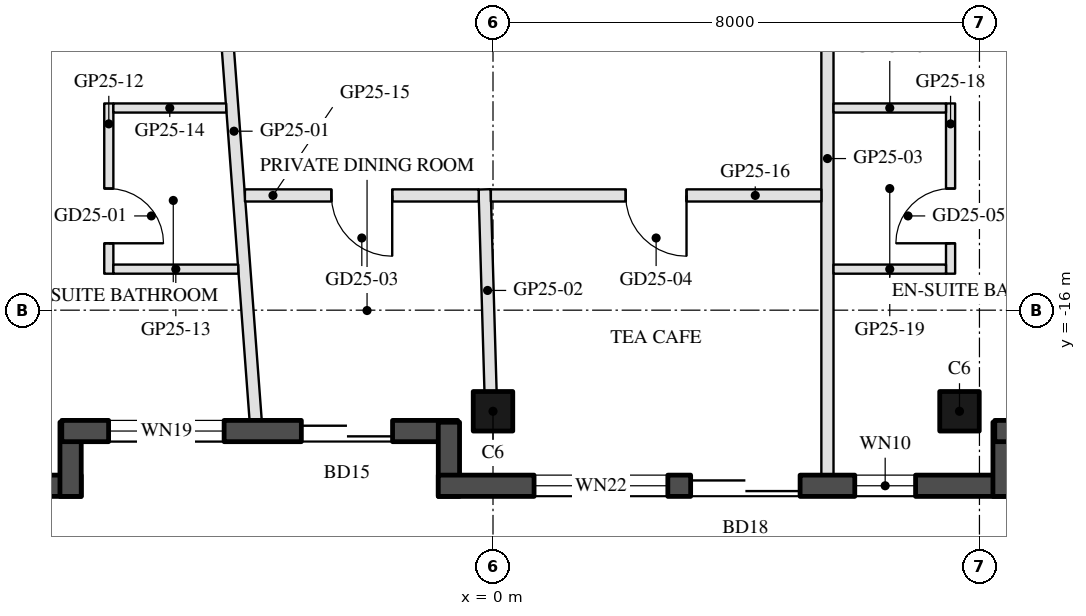
"""IFC4 building model, lengths in metres.
Left out: names, types, materials, properties, quantities, classifications, styles, units other than length and angle.
Written with IfcOpenShell. Run it as: python <this file> out.ifc"""

import sys

from ifc_helpers import new_model, si_unit, direction, frame, frame_2d, origin, origin_2d, place, context, subcontext, project, spatial, rectangle, hollow_rectangle, extrude, boolean, halfspace, element, fill, save


model = new_model("IFC4")
c1 = context("Model", 3, precision=1e-05, world=origin(), true_north=direction((0.0, 1.0)))
c2 = subcontext(c1, "Body", "Model", "MODEL_VIEW")
j1 = project(units=[si_unit("LENGTHUNIT", "METRE"), si_unit("PLANEANGLEUNIT", "RADIAN")], contexts=[c1])
p1 = place(None, origin())
s1 = spatial("IfcSite", under=j1, at=p1, CompositionType="ELEMENT")
p2 = place(p1, origin())
s2 = spatial("IfcBuilding", under=s1, at=p2, CompositionType="ELEMENT")
p3 = place(p2, frame((0.0, 0.0, 257.8)))
s3 = spatial("IfcBuildingStorey", under=s2, at=p3, CompositionType="ELEMENT", Elevation=257.8)
p4 = place(p3, frame((0.0, -17.663, 0.0), z_axis=(0.0, 0.0, 1.0), x_axis=(-1.0, 0.0, 0.0)))
e1 = element("IfcColumn", 1, at=p4, inside=s3, PredefinedType="COLUMN", context=c2, shape_type="SweptSolid", body=[
    boolean("DIFFERENCE", extrude(hollow_rectangle(XDim=0.65, YDim=0.65, WallThickness=0.03, at=origin_2d()), origin(), (0.0, 0.0, 1.0), 3.7), halfspace(frame((0.0, 0.0, 0.037), z_axis=(0.0, 0.0, 1.0), x_axis=(1.0, 0.0, 0.0)), True)),
])
p5 = place(p3, frame((7.672, -17.663, 0.0), z_axis=(0.0, 0.0, 1.0), x_axis=(-1.0, 0.0, 0.0)))
e2 = element("IfcColumn", 2, at=p5, inside=s3, PredefinedType="COLUMN", context=c2, shape_type="SweptSolid", body=[
    boolean("DIFFERENCE", extrude(hollow_rectangle(XDim=0.65, YDim=0.65, WallThickness=0.03, at=origin_2d()), origin(), (0.0, 0.0, 1.0), 3.7), halfspace(frame((0.0, 0.0, 0.04), z_axis=(0.0, 0.0, 1.0), x_axis=(1.0, 0.0, 0.0)), True)),
])
p6 = place(p3, frame((-18.272, -18.888, 0.0), z_axis=(0.0, 0.0, 1.0), x_axis=(1.0, 0.0, 0.0)))
e3 = element("IfcWall", 3, at=p6, inside=s3, PredefinedType="SOLIDWALL", context=c2, shape_type="SweptSolid", body=[
    extrude(rectangle(XDim=11.5, YDim=0.35, at=frame_2d((5.75, 0.0))), origin(), (0.0, 0.0, 1.0), 3.55),
])
p7 = place(p6, frame((0.38, 0.0, 0.3)))
e4 = element("IfcOpeningElement", 4, at=p7, cuts=e3, PredefinedType="OPENING", context=c2, shape_type="SweptSolid", body=[
    extrude(rectangle(XDim=1.8, YDim=2.65, at=frame_2d((0.9, 1.325))), frame((0.0, 0.185, 0.0), z_axis=(0.0, -1.0, 0.0), x_axis=(1.0, 0.0, 0.0)), (0.0, 0.0, 1.0), 0.37),
])
p8 = place(p6, frame((7.525, 0.0, 0.0)))
e5 = element("IfcOpeningElement", 5, at=p8, cuts=e3, PredefinedType="OPENING", context=c2, shape_type="SweptSolid", body=[
    extrude(rectangle(XDim=2.4, YDim=2.4, at=frame_2d((1.2, 1.2))), frame((0.0, 0.185, 0.0), z_axis=(0.0, -1.0, 0.0), x_axis=(1.0, 0.0, 0.0)), (0.0, 0.0, 1.0), 0.37),
])
p9 = place(p6, frame((3.604, 0.0, 0.3)))
e6 = element("IfcOpeningElement", 6, at=p9, cuts=e3, PredefinedType="OPENING", context=c2, shape_type="SweptSolid", body=[
    extrude(rectangle(XDim=1.6, YDim=2.65, at=frame_2d((0.8, 1.325))), frame((0.0, 0.185, 0.0), z_axis=(0.0, -1.0, 0.0), x_axis=(1.0, 0.0, 0.0)), (0.0, 0.0, 1.0), 0.37),
])
p10 = place(p6, frame((5.504, 0.0, 0.3)))
e7 = element("IfcOpeningElement", 7, at=p10, cuts=e3, PredefinedType="OPENING", context=c2, shape_type="SweptSolid", body=[
    extrude(rectangle(XDim=1.6, YDim=2.65, at=frame_2d((0.8, 1.325))), frame((0.0, 0.185, 0.0), z_axis=(0.0, -1.0, 0.0), x_axis=(1.0, 0.0, 0.0)), (0.0, 0.0, 1.0), 0.37),
])
p11 = place(p3, frame((-6.947, -19.063, 0.0), z_axis=(0.0, 0.0, 1.0), x_axis=(0.0, 1.0, 0.0)))
e8 = element("IfcWall", 8, at=p11, inside=s3, PredefinedType="SOLIDWALL", context=c2, shape_type="SweptSolid", body=[
    extrude(rectangle(XDim=1.22, YDim=0.35, at=frame_2d((0.61, 0.0))), origin(), (0.0, 0.0, 1.0), 3.55),
])
p12 = place(p3, frame((-7.092, -17.988, 0.0), z_axis=(0.0, 0.0, 1.0), x_axis=(1.0, 0.0, 0.0)))
e9 = element("IfcWall", 9, at=p12, inside=s3, PredefinedType="SOLIDWALL", context=c2, shape_type="SweptSolid", body=[
    extrude(rectangle(XDim=6.512, YDim=0.35, at=frame_2d((3.256, 0.0))), origin(), (0.0, 0.0, 1.0), 3.55),
])
p13 = place(p12, frame((0.77, 0.0, 0.3)))
e10 = element("IfcOpeningElement", 10, at=p13, cuts=e9, PredefinedType="OPENING", context=c2, shape_type="SweptSolid", body=[
    extrude(rectangle(XDim=1.9, YDim=2.65, at=frame_2d((0.95, 1.325))), frame((0.0, 0.185, 0.0), z_axis=(0.0, -1.0, 0.0), x_axis=(1.0, 0.0, 0.0)), (0.0, 0.0, 1.0), 0.37),
])
p14 = place(p12, frame((3.94, 0.0, 0.0)))
e11 = element("IfcOpeningElement", 11, at=p14, cuts=e9, PredefinedType="OPENING", context=c2, shape_type="SweptSolid", body=[
    extrude(rectangle(XDim=1.5, YDim=2.4, at=frame_2d((0.75, 1.2))), frame((0.0, 0.185, 0.0), z_axis=(0.0, -1.0, 0.0), x_axis=(1.0, 0.0, 0.0)), (0.0, 0.0, 1.0), 0.37),
])
p15 = place(p3, frame((-0.725, -17.843, 0.0), z_axis=(0.0, 0.0, 1.0), x_axis=(0.0, -1.0, 0.0)))
e12 = element("IfcWall", 12, at=p15, inside=s3, PredefinedType="SOLIDWALL", context=c2, shape_type="SweptSolid", body=[
    extrude(rectangle(XDim=1.22, YDim=0.35, at=frame_2d((0.61, 0.0))), origin(), (0.0, 0.0, 1.0), 3.55),
])
p16 = place(p3, frame((-0.9, -18.888, 0.0), z_axis=(0.0, 0.0, 1.0), x_axis=(1.0, 0.0, 0.0)))
e13 = element("IfcWall", 13, at=p16, inside=s3, PredefinedType="SOLIDWALL", context=c2, shape_type="SweptSolid", body=[
    extrude(rectangle(XDim=9.472, YDim=0.35, at=frame_2d((4.736, 0.0))), origin(), (0.0, 0.0, 1.0), 3.55),
])
p17 = place(p16, frame((4.15, 0.0, 0.0)))
e14 = element("IfcOpeningElement", 14, at=p17, cuts=e13, PredefinedType="OPENING", context=c2, shape_type="SweptSolid", body=[
    extrude(rectangle(XDim=1.8, YDim=2.4, at=frame_2d((0.9, 1.2))), frame((0.0, 0.185, 0.0), z_axis=(0.0, -1.0, 0.0), x_axis=(1.0, 0.0, 0.0)), (0.0, 0.0, 1.0), 0.37),
])
p18 = place(p16, frame((1.575, 0.0, 0.3)))
e15 = element("IfcOpeningElement", 15, at=p18, cuts=e13, PredefinedType="OPENING", context=c2, shape_type="SweptSolid", body=[
    extrude(rectangle(XDim=2.2, YDim=2.65, at=frame_2d((1.1, 1.325))), frame((0.0, 0.185, 0.0), z_axis=(0.0, -1.0, 0.0), x_axis=(1.0, 0.0, 0.0)), (0.0, 0.0, 1.0), 0.37),
])
p19 = place(p16, frame((6.85, 0.0, 0.3)))
e16 = element("IfcOpeningElement", 16, at=p19, cuts=e13, PredefinedType="OPENING", context=c2, shape_type="SweptSolid", body=[
    extrude(rectangle(XDim=1.0, YDim=2.65, at=frame_2d((0.5, 1.325))), frame((0.0, 0.185, 0.0), z_axis=(0.0, -1.0, 0.0), x_axis=(1.0, 0.0, 0.0)), (0.0, 0.0, 1.0), 0.37),
])
p20 = place(p3, frame((8.397, -19.063, 0.0), z_axis=(0.0, 0.0, 1.0), x_axis=(0.0, 1.0, 0.0)))
e17 = element("IfcWall", 17, at=p20, inside=s3, PredefinedType="SOLIDWALL", context=c2, shape_type="SweptSolid", body=[
    extrude(rectangle(XDim=1.22, YDim=0.35, at=frame_2d((0.61, 0.0))), origin(), (0.0, 0.0, 1.0), 3.55),
])
p21 = place(p3, frame((8.252, -17.988, 0.0), z_axis=(0.0, 0.0, 1.0), x_axis=(1.0, 0.0, 0.0)))
e18 = element("IfcWall", 18, at=p21, inside=s3, PredefinedType="SOLIDWALL", context=c2, shape_type="SweptSolid", body=[
    extrude(rectangle(XDim=6.512, YDim=0.35, at=frame_2d((3.256, 0.0))), origin(), (0.0, 0.0, 1.0), 3.55),
])
p22 = place(p21, frame((0.77, 0.0, 0.0)))
e19 = element("IfcOpeningElement", 19, at=p22, cuts=e18, PredefinedType="OPENING", context=c2, shape_type="SweptSolid", body=[
    extrude(rectangle(XDim=2.4, YDim=2.4, at=frame_2d((1.2, 1.2))), frame((0.0, 0.185, 0.0), z_axis=(0.0, -1.0, 0.0), x_axis=(1.0, 0.0, 0.0)), (0.0, 0.0, 1.0), 0.37),
])
p23 = place(p21, frame((3.47, 0.0, 0.3)))
e20 = element("IfcOpeningElement", 20, at=p23, cuts=e18, PredefinedType="OPENING", context=c2, shape_type="SweptSolid", body=[
    extrude(rectangle(XDim=2.2, YDim=2.65, at=frame_2d((1.1, 1.325))), frame((0.0, 0.185, 0.0), z_axis=(0.0, -1.0, 0.0), x_axis=(1.0, 0.0, 0.0)), (0.0, 0.0, 1.0), 0.37),
])
p24 = place(p3, frame((8.547, -10.997, 0.0), z_axis=(0.0, 0.0, 1.0), x_axis=(0.86602744543, -0.49999646375, 0.0)))
e21 = element("IfcWall", 21, at=p24, inside=s3, PredefinedType="SHEAR", context=c2, shape_type="SweptSolid", body=[
    extrude(rectangle(XDim=13.934, YDim=0.5, at=frame_2d((6.967, 0.0))), origin(), (0.0, 0.0, 1.0), 3.5),
])
p25 = place(p3, frame((-3.903, -17.813, 0.0), z_axis=(0.0, 0.0, 1.0), x_axis=(-0.074602257677, 0.997213368918, 0.0)))
e22 = element("IfcWall", 22, at=p25, inside=s3, PredefinedType="PARTITIONING", context=c2, shape_type="SweptSolid", body=[
    extrude(rectangle(XDim=9.54, YDim=0.2, at=frame_2d((4.77, 0.0))), origin(), (0.0, 0.0, 1.0), 3.0),
])
p26 = place(p3, frame((-0.04, -17.338, 0.0), z_axis=(0.0, 0.0, 1.0), x_axis=(-0.029431403757, 0.999566802406, 0.0)))
e23 = element("IfcWall", 23, at=p26, inside=s3, PredefinedType="PARTITIONING", context=c2, shape_type="SweptSolid", body=[
    extrude(rectangle(XDim=3.326, YDim=0.2, at=frame_2d((1.663, 0.0))), origin(), (0.0, 0.0, 1.0), 3.0),
])
p27 = place(p3, frame((5.5, -18.713, 0.0), z_axis=(0.0, 0.0, 1.0), x_axis=(0.0, 1.0, 0.0)))
e24 = element("IfcWall", 24, at=p27, inside=s3, PredefinedType="PARTITIONING", context=c2, shape_type="SweptSolid", body=[
    extrude(rectangle(XDim=10.413, YDim=0.2, at=frame_2d((5.207, 0.0))), origin(), (0.0, 0.0, 1.0), 3.16),
])
p28 = place(p3, frame((-6.319, -12.6, 0.0), z_axis=(0.0, 0.0, 1.0), x_axis=(0.0, -1.0, 0.0)))
e25 = element("IfcWall", 25, at=p28, inside=s3, PredefinedType="PARTITIONING", context=c2, shape_type="SweptSolid", body=[
    extrude(rectangle(XDim=2.8, YDim=0.15, at=frame_2d((1.4, 0.0))), origin(), (0.0, 0.0, 1.0), 3.55),
])
p29 = place(p28, frame((1.4, 0.0, 0.0)))
e26 = element("IfcOpeningElement", 26, at=p29, cuts=e25, PredefinedType="OPENING", context=c2, shape_type="SweptSolid", body=[
    extrude(rectangle(XDim=0.9, YDim=2.1, at=frame_2d((0.45, 1.05))), frame((0.0, 0.085, 0.0), z_axis=(0.0, -1.0, 0.0), x_axis=(1.0, 0.0, 0.0)), (0.0, 0.0, 1.0), 0.17),
])
p30 = place(p3, frame((-6.243, -15.325, 0.0), z_axis=(0.0, 0.0, 1.0), x_axis=(1.0, 0.0, 0.0)))
e27 = element("IfcWall", 27, at=p30, inside=s3, PredefinedType="PARTITIONING", context=c2, shape_type="SweptSolid", body=[
    extrude(rectangle(XDim=2.054, YDim=0.15, at=frame_2d((1.027, 0.0))), origin(), (0.0, 0.0, 1.0), 3.55),
])
p31 = place(p3, frame((-6.243, -12.675, 0.0), z_axis=(0.0, 0.0, 1.0), x_axis=(1.0, 0.0, 0.0)))
e28 = element("IfcWall", 28, at=p31, inside=s3, PredefinedType="PARTITIONING", context=c2, shape_type="SweptSolid", body=[
    extrude(rectangle(XDim=1.855, YDim=0.15, at=frame_2d((0.928, 0.0))), origin(), (0.0, 0.0, 1.0), 3.55),
])
p32 = place(p3, frame((-0.235, -14.113, 0.0), z_axis=(0.0, 0.0, 1.0), x_axis=(-1.0, 0.0, 0.0)))
e29 = element("IfcWall", 29, at=p32, inside=s3, PredefinedType="PARTITIONING", context=c2, shape_type="SweptSolid", body=[
    extrude(rectangle(XDim=3.845, YDim=0.2, at=frame_2d((1.922, 0.0))), origin(), (0.0, 0.0, 1.0), 3.0),
])
p33 = place(p32, frame((1.422, 0.0, 0.0)))
e30 = element("IfcOpeningElement", 30, at=p33, cuts=e29, PredefinedType="OPENING", context=c2, shape_type="SweptSolid", body=[
    extrude(rectangle(XDim=1.0, YDim=2.1, at=frame_2d((0.5, 1.05))), frame((0.0, 0.11, 0.0), z_axis=(0.0, -1.0, 0.0), x_axis=(1.0, 0.0, 0.0)), (0.0, 0.0, 1.0), 0.22),
])
p34 = place(p3, frame((5.4, -14.113, 0.0), z_axis=(0.0, 0.0, 1.0), x_axis=(-1.0, 0.0, 0.0)))
e31 = element("IfcWall", 31, at=p34, inside=s3, PredefinedType="PARTITIONING", context=c2, shape_type="SweptSolid", body=[
    extrude(rectangle(XDim=5.435, YDim=0.2, at=frame_2d((2.718, 0.0))), origin(), (0.0, 0.0, 1.0), 3.0),
])
p35 = place(p34, frame((2.218, 0.0, 0.0)))
e32 = element("IfcOpeningElement", 32, at=p35, cuts=e31, PredefinedType="OPENING", context=c2, shape_type="SweptSolid", body=[
    extrude(rectangle(XDim=1.0, YDim=2.1, at=frame_2d((0.5, 1.05))), frame((0.0, 0.11, 0.0), z_axis=(0.0, -1.0, 0.0), x_axis=(1.0, 0.0, 0.0)), (0.0, 0.0, 1.0), 0.22),
])
p36 = place(p3, frame((7.525, -15.4, 0.0), z_axis=(0.0, 0.0, 1.0), x_axis=(0.0, 1.0, 0.0)))
e33 = element("IfcWall", 33, at=p36, inside=s3, PredefinedType="PARTITIONING", context=c2, shape_type="SweptSolid", body=[
    extrude(rectangle(XDim=2.8, YDim=0.15, at=frame_2d((1.4, 0.0))), origin(), (0.0, 0.0, 1.0), 3.0),
])
p37 = place(p36, frame((0.5, 0.0, 0.0)))
e34 = element("IfcOpeningElement", 34, at=p37, cuts=e33, PredefinedType="OPENING", context=c2, shape_type="SweptSolid", body=[
    extrude(rectangle(XDim=0.9, YDim=2.1, at=frame_2d((0.45, 1.05))), frame((0.0, 0.085, 0.0), z_axis=(0.0, -1.0, 0.0), x_axis=(1.0, 0.0, 0.0)), (0.0, 0.0, 1.0), 0.17),
])
for number, where, z_axis, x_axis in (
    (35, (5.6, -15.325, 0.0), (0.0, 0.0, 1.0), (1.0, 0.0, 0.0)),
    (36, (5.6, -12.675, 0.0), (0.0, 0.0, 1.0), (1.0, 0.0, 0.0)),
):
    element("IfcWall", number, at=place(p3, frame(where, z_axis=z_axis, x_axis=x_axis)), inside=s3, PredefinedType="PARTITIONING", context=c2, shape_type="SweptSolid", body=[
        extrude(rectangle(XDim=1.85, YDim=0.15, at=frame_2d((0.925, 0.0))), origin(), (0.0, 0.0, 1.0), 3.55),
    ])
p38 = place(p13, origin())
e37 = element("IfcWindow", 37, at=p38, inside=s3, PartitioningType="SINGLE_PANEL", PredefinedType="WINDOW", context=c2, shape_type="SweptSolid", body=[
    extrude(rectangle(XDim=1.9, YDim=2.65, at=frame_2d((0.95, 1.325))), frame((0.0, 0.03, 0.0), z_axis=(0.0, -1.0, 0.0), x_axis=(1.0, 0.0, 0.0)), (0.0, 0.0, 1.0), 0.06),
])
fill(e10, e37)
p39 = place(p14, frame((1.5, 0.0, 0.0), z_axis=(0.0, 0.0, 1.0), x_axis=(-1.0, 0.0, 0.0)))
e38 = element("IfcDoor", 38, at=p39, inside=s3, OperationType="SLIDING_TO_LEFT", PredefinedType="DOOR", context=c2, shape_type="SweptSolid", body=[
    extrude(rectangle(XDim=1.5, YDim=2.4, at=frame_2d((0.75, 1.2))), frame((0.0, 0.025, 0.0), z_axis=(0.0, -1.0, 0.0), x_axis=(1.0, 0.0, 0.0)), (0.0, 0.0, 1.0), 0.05),
])
fill(e11, e38)
p40 = place(p17, frame((1.8, 0.0, 0.0), z_axis=(0.0, 0.0, 1.0), x_axis=(-1.0, 0.0, 0.0)))
e39 = element("IfcDoor", 39, at=p40, inside=s3, OperationType="SLIDING_TO_LEFT", PredefinedType="DOOR", context=c2, shape_type="SweptSolid", body=[
    extrude(rectangle(XDim=1.8, YDim=2.4, at=frame_2d((0.9, 1.2))), frame((0.0, 0.025, 0.0), z_axis=(0.0, -1.0, 0.0), x_axis=(1.0, 0.0, 0.0)), (0.0, 0.0, 1.0), 0.05),
])
fill(e14, e39)
p41 = place(p18, origin())
e40 = element("IfcWindow", 40, at=p41, inside=s3, PartitioningType="SINGLE_PANEL", PredefinedType="WINDOW", context=c2, shape_type="SweptSolid", body=[
    extrude(rectangle(XDim=2.2, YDim=2.65, at=frame_2d((1.1, 1.325))), frame((0.0, 0.03, 0.0), z_axis=(0.0, -1.0, 0.0), x_axis=(1.0, 0.0, 0.0)), (0.0, 0.0, 1.0), 0.06),
])
fill(e15, e40)
p42 = place(p19, origin())
e41 = element("IfcWindow", 41, at=p42, inside=s3, PartitioningType="SINGLE_PANEL", PredefinedType="WINDOW", context=c2, shape_type="SweptSolid", body=[
    extrude(rectangle(XDim=1.0, YDim=2.65, at=frame_2d((0.5, 1.325))), frame((0.0, 0.03, 0.0), z_axis=(0.0, -1.0, 0.0), x_axis=(1.0, 0.0, 0.0)), (0.0, 0.0, 1.0), 0.06),
])
fill(e16, e41)
p43 = place(p29, origin())
e42 = element("IfcDoor", 42, at=p43, inside=s3, OperationType="SINGLE_SWING_RIGHT", PredefinedType="DOOR", context=c2, shape_type="SweptSolid", body=[
    extrude(rectangle(XDim=0.9, YDim=2.1, at=frame_2d((0.45, 1.05))), frame((0.0, 0.025, 0.0), z_axis=(0.0, -1.0, 0.0), x_axis=(1.0, 0.0, 0.0)), (0.0, 0.0, 1.0), 0.05),
])
fill(e26, e42)
p44 = place(p33, origin())
e43 = element("IfcDoor", 43, at=p44, inside=s3, OperationType="SINGLE_SWING_LEFT", PredefinedType="DOOR", context=c2, shape_type="SweptSolid", body=[
    extrude(rectangle(XDim=1.0, YDim=2.1, at=frame_2d((0.5, 1.05))), frame((0.0, 0.025, 0.0), z_axis=(0.0, -1.0, 0.0), x_axis=(1.0, 0.0, 0.0)), (0.0, 0.0, 1.0), 0.05),
])
fill(e30, e43)
p45 = place(p35, origin())
e44 = element("IfcDoor", 44, at=p45, inside=s3, OperationType="SINGLE_SWING_LEFT", PredefinedType="DOOR", context=c2, shape_type="SweptSolid", body=[
    extrude(rectangle(XDim=1.0, YDim=2.1, at=frame_2d((0.5, 1.05))), frame((0.0, 0.025, 0.0), z_axis=(0.0, -1.0, 0.0), x_axis=(1.0, 0.0, 0.0)), (0.0, 0.0, 1.0), 0.05),
])
fill(e32, e44)
p46 = place(p37, origin())
e45 = element("IfcDoor", 45, at=p46, inside=s3, OperationType="SINGLE_SWING_LEFT", PredefinedType="DOOR", context=c2, shape_type="SweptSolid", body=[
    extrude(rectangle(XDim=0.9, YDim=2.1, at=frame_2d((0.45, 1.05))), frame((0.0, 0.025, 0.0), z_axis=(0.0, -1.0, 0.0), x_axis=(1.0, 0.0, 0.0)), (0.0, 0.0, 1.0), 0.05),
])
fill(e34, e45)
save(model, sys.argv[1])
